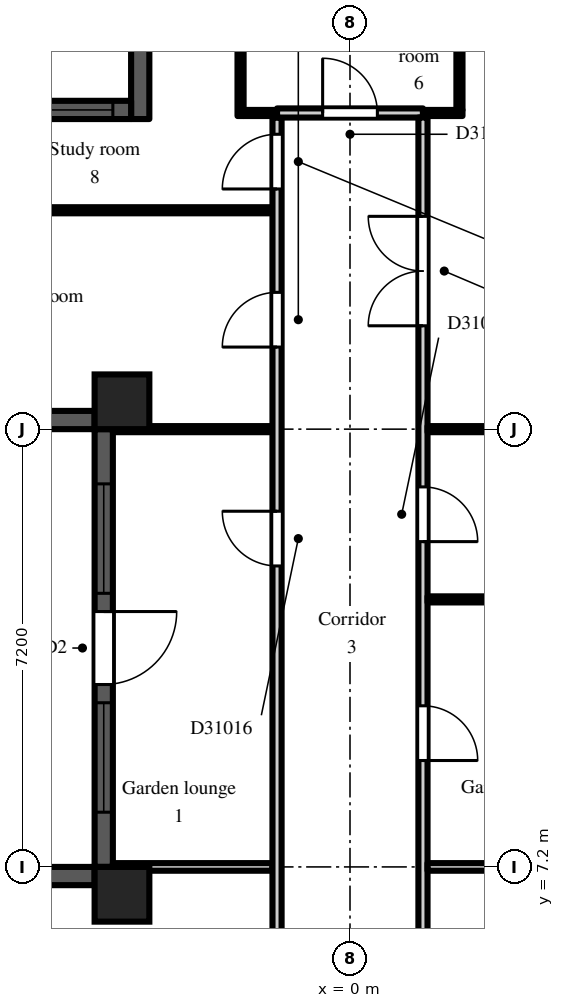
"""IFC4 building model, lengths in metres.
Left out: names, types, materials, properties, quantities, classifications, styles, units other than length and angle.
Written with IfcOpenShell. Run it as: python <this file> out.ifc"""

import sys

from ifc_helpers import new_model, si_unit, direction, frame, frame_2d, origin, origin_2d, place, context, subcontext, project, spatial, rectangle, extrude, element, fill, save


model = new_model("IFC4")
c1 = context("Model", 3, precision=1e-05, world=origin(), true_north=direction((0.0, 1.0)))
c2 = subcontext(c1, "Body", "Model", "MODEL_VIEW")
j1 = project(units=[si_unit("LENGTHUNIT", "METRE"), si_unit("PLANEANGLEUNIT", "RADIAN")], contexts=[c1])
p1 = place(None, origin())
s1 = spatial("IfcSite", under=j1, at=p1, CompositionType="ELEMENT")
p2 = place(p1, origin())
s2 = spatial("IfcBuilding", under=s1, at=p2, CompositionType="ELEMENT")
p3 = place(p2, frame((0.0, 0.0, 216.9)))
s3 = spatial("IfcBuildingStorey", under=s2, at=p3, CompositionType="ELEMENT", Elevation=216.9)
for number, where, z_axis, x_axis in (
    (1, (-3.75, 6.75, 0.0), (0.0, 0.0, 1.0), (1.0, 0.0, 0.0)),
    (2, (-3.75, 14.85, 0.0), (0.0, 0.0, 1.0), (1.0, 0.0, 0.0)),
):
    element("IfcColumn", number, at=place(p3, frame(where, z_axis=z_axis, x_axis=x_axis)), inside=s3, PredefinedType="COLUMN", context=c2, shape_type="SweptSolid", body=[
        extrude(rectangle(XDim=0.9, YDim=0.9, at=origin_2d()), origin(), (0.0, 0.0, 1.0), 3.0),
    ])
p4 = place(p3, frame((-3.45, 20.7, 0.0), z_axis=(0.0, 0.0, 1.0), x_axis=(0.0, -1.0, 0.0)))
e3 = element("IfcWall", 3, at=p4, inside=s3, PredefinedType="SOLIDWALL", context=c2, shape_type="SweptSolid", body=[
    extrude(rectangle(XDim=1.2, YDim=0.3, at=frame_2d((0.6, 0.0))), origin(), (0.0, 0.0, 1.0), 2.6),
])
p5 = place(p3, frame((-3.6, 19.65, 0.0), z_axis=(0.0, 0.0, 1.0), x_axis=(-1.0, 0.0, 0.0)))
e4 = element("IfcWall", 4, at=p5, inside=s3, PredefinedType="SOLIDWALL", context=c2, shape_type="SweptSolid", body=[
    extrude(rectangle(XDim=1.8, YDim=0.3, at=frame_2d((0.9, 0.0))), origin(), (0.0, 0.0, 1.0), 2.6),
])
p6 = place(p5, frame((0.3, 0.0, 0.2)))
e5 = element("IfcOpeningElement", 5, at=p6, cuts=e4, PredefinedType="OPENING", context=c2, shape_type="SweptSolid", body=[
    extrude(rectangle(XDim=1.2, YDim=1.85, at=frame_2d((0.6, 0.925))), frame((0.0, 0.16, 0.0), z_axis=(0.0, -1.0, 0.0), x_axis=(1.0, 0.0, 0.0)), (0.0, 0.0, 1.0), 0.32),
])
p7 = place(p3, frame((-6.3, 14.55, 0.0), z_axis=(0.0, 0.0, 1.0), x_axis=(1.0, 0.0, 0.0)))
e6 = element("IfcWall", 6, at=p7, inside=s3, PredefinedType="SOLIDWALL", context=c2, shape_type="SweptSolid", body=[
    extrude(rectangle(XDim=2.1, YDim=0.3, at=frame_2d((1.05, 0.0))), origin(), (0.0, 0.0, 1.0), 2.3),
])
p8 = place(p3, frame((-4.05, 14.4, 0.0), z_axis=(0.0, 0.0, 1.0), x_axis=(0.0, -1.0, 0.0)))
e7 = element("IfcWall", 7, at=p8, inside=s3, PredefinedType="SOLIDWALL", context=c2, shape_type="SweptSolid", body=[
    extrude(rectangle(XDim=7.2, YDim=0.3, at=frame_2d((3.6, 0.0))), origin(), (0.0, 0.0, 1.0), 2.3),
])
p9 = place(p8, frame((3.0, 0.0, 0.0)))
e8 = element("IfcOpeningElement", 8, at=p9, cuts=e7, PredefinedType="OPENING", context=c2, shape_type="SweptSolid", body=[
    extrude(rectangle(XDim=1.2, YDim=2.05, at=frame_2d((0.6, 1.025))), frame((0.0, 0.16, 0.0), z_axis=(0.0, -1.0, 0.0), x_axis=(1.0, 0.0, 0.0)), (0.0, 0.0, 1.0), 0.32),
])
p10 = place(p8, frame((0.9, 0.0, 0.2)))
e9 = element("IfcOpeningElement", 9, at=p10, cuts=e7, PredefinedType="OPENING", context=c2, shape_type="SweptSolid", body=[
    extrude(rectangle(XDim=1.8, YDim=1.85, at=frame_2d((0.9, 0.925))), frame((0.0, 0.16, 0.0), z_axis=(0.0, -1.0, 0.0), x_axis=(1.0, 0.0, 0.0)), (0.0, 0.0, 1.0), 0.32),
])
p11 = place(p8, frame((4.5, 0.0, 0.2)))
e10 = element("IfcOpeningElement", 10, at=p11, cuts=e7, PredefinedType="OPENING", context=c2, shape_type="SweptSolid", body=[
    extrude(rectangle(XDim=1.8, YDim=1.85, at=frame_2d((0.9, 0.925))), frame((0.0, 0.16, 0.0), z_axis=(0.0, -1.0, 0.0), x_axis=(1.0, 0.0, 0.0)), (0.0, 0.0, 1.0), 0.32),
])
p12 = place(p3, frame((-4.2, 7.05, 0.0), z_axis=(0.0, 0.0, 1.0), x_axis=(-1.0, 0.0, 0.0)))
e11 = element("IfcWall", 11, at=p12, inside=s3, PredefinedType="SOLIDWALL", context=c2, shape_type="SweptSolid", body=[
    extrude(rectangle(XDim=3.0, YDim=0.3, at=frame_2d((1.5, 0.0))), origin(), (0.0, 0.0, 1.0), 2.3),
])
p13 = place(p3, frame((-5.1, 18.0, 0.0), z_axis=(0.0, 0.0, 1.0), x_axis=(1.0, 0.0, 0.0)))
e12 = element("IfcWall", 12, at=p13, inside=s3, PredefinedType="PARTITIONING", context=c2, shape_type="SweptSolid", body=[
    extrude(rectangle(XDim=3.825, YDim=0.1, at=frame_2d((1.913, 0.0))), origin(), (0.0, 0.0, 1.0), 2.6),
])
p14 = place(p3, frame((-3.9, 7.2, 0.0), z_axis=(0.0, 0.0, 1.0), x_axis=(1.0, 0.0, 0.0)))
e13 = element("IfcWall", 13, at=p14, inside=s3, PredefinedType="PARTITIONING", context=c2, shape_type="SweptSolid", body=[
    extrude(rectangle(XDim=2.625, YDim=0.125, at=frame_2d((1.312, 0.0))), origin(), (0.0, 0.0, 1.0), 2.6),
])
p15 = place(p3, frame((-3.9, 14.4, 0.0), z_axis=(0.0, 0.0, 1.0), x_axis=(1.0, 0.0, 0.0)))
e14 = element("IfcWall", 14, at=p15, inside=s3, PredefinedType="PARTITIONING", context=c2, shape_type="SweptSolid", body=[
    extrude(rectangle(XDim=2.625, YDim=0.1, at=frame_2d((1.312, 0.0))), origin(), (0.0, 0.0, 1.0), 2.6),
])
p16 = place(p3, frame((-1.8, 19.55, 0.0), z_axis=(0.0, 0.0, 1.0), x_axis=(0.0, 1.0, 0.0)))
e15 = element("IfcWall", 15, at=p16, inside=s3, PredefinedType="PARTITIONING", context=c2, shape_type="SweptSolid", body=[
    extrude(rectangle(XDim=1.75, YDim=0.1, at=frame_2d((0.875, 0.0))), origin(), (0.0, 0.0, 1.0), 2.6),
])
p17 = place(p3, frame((-1.75, 19.6, 0.0), z_axis=(0.0, 0.0, 1.0), x_axis=(1.0, 0.0, 0.0)))
e16 = element("IfcWall", 16, at=p17, inside=s3, PredefinedType="PARTITIONING", context=c2, shape_type="SweptSolid", body=[
    extrude(rectangle(XDim=0.55, YDim=0.1, at=frame_2d((0.275, 0.0))), origin(), (0.0, 0.0, 1.0), 2.6),
])
p18 = place(p3, frame((-1.2, 1.275, 0.0), z_axis=(0.0, 0.0, 1.0), x_axis=(0.0, 1.0, 0.0)))
e17 = element("IfcWall", 17, at=p18, inside=s3, PredefinedType="PARTITIONING", context=c2, shape_type="SweptSolid", body=[
    extrude(rectangle(XDim=18.25, YDim=0.15, at=frame_2d((9.125, 0.0))), origin(), (0.0, 0.0, 1.0), 2.6),
])
p19 = place(p18, frame((2.475, 0.0, 0.0)))
e18 = element("IfcOpeningElement", 18, at=p19, cuts=e17, PredefinedType="OPENING", context=c2, shape_type="SweptSolid", body=[
    extrude(rectangle(XDim=0.9, YDim=2.1, at=frame_2d((0.45, 1.05))), frame((0.0, 0.085, 0.0), z_axis=(0.0, -1.0, 0.0), x_axis=(1.0, 0.0, 0.0)), (0.0, 0.0, 1.0), 0.17),
])
p20 = place(p18, frame((10.875, 0.0, 0.0)))
e19 = element("IfcOpeningElement", 19, at=p20, cuts=e17, PredefinedType="OPENING", context=c2, shape_type="SweptSolid", body=[
    extrude(rectangle(XDim=0.9, YDim=2.1, at=frame_2d((0.45, 1.05))), frame((0.0, 0.085, 0.0), z_axis=(0.0, -1.0, 0.0), x_axis=(1.0, 0.0, 0.0)), (0.0, 0.0, 1.0), 0.17),
])
p21 = place(p18, frame((14.475, 0.0, 0.0)))
e20 = element("IfcOpeningElement", 20, at=p21, cuts=e17, PredefinedType="OPENING", context=c2, shape_type="SweptSolid", body=[
    extrude(rectangle(XDim=0.9, YDim=2.1, at=frame_2d((0.45, 1.05))), frame((0.0, 0.085, 0.0), z_axis=(0.0, -1.0, 0.0), x_axis=(1.0, 0.0, 0.0)), (0.0, 0.0, 1.0), 0.17),
])
p22 = place(p18, frame((17.075, 0.0, 0.0)))
e21 = element("IfcOpeningElement", 21, at=p22, cuts=e17, PredefinedType="OPENING", context=c2, shape_type="SweptSolid", body=[
    extrude(rectangle(XDim=0.9, YDim=2.1, at=frame_2d((0.45, 1.05))), frame((0.0, 0.085, 0.0), z_axis=(0.0, -1.0, 0.0), x_axis=(1.0, 0.0, 0.0)), (0.0, 0.0, 1.0), 0.17),
])
p23 = place(p3, frame((-1.2, 19.6, 0.0), z_axis=(0.0, 0.0, 1.0), x_axis=(1.0, 0.0, 0.0)))
e22 = element("IfcWall", 22, at=p23, inside=s3, PredefinedType="PARTITIONING", context=c2, shape_type="SweptSolid", body=[
    extrude(rectangle(XDim=2.4, YDim=0.15, at=frame_2d((1.2, 0.0))), origin(), (0.0, 0.0, 1.0), 2.6),
])
p24 = place(p23, frame((0.75, 0.0, 0.0)))
e23 = element("IfcOpeningElement", 23, at=p24, cuts=e22, PredefinedType="OPENING", context=c2, shape_type="SweptSolid", body=[
    extrude(rectangle(XDim=0.9, YDim=2.1, at=frame_2d((0.45, 1.05))), frame((0.0, 0.085, 0.0), z_axis=(0.0, -1.0, 0.0), x_axis=(1.0, 0.0, 0.0)), (0.0, 0.0, 1.0), 0.17),
])
p25 = place(p3, frame((1.2, 1.125, 0.0), z_axis=(0.0, 0.0, 1.0), x_axis=(0.0, 1.0, 0.0)))
e24 = element("IfcWall", 24, at=p25, inside=s3, PredefinedType="PARTITIONING", context=c2, shape_type="SweptSolid", body=[
    extrude(rectangle(XDim=18.4, YDim=0.15, at=frame_2d((9.2, 0.0))), origin(), (0.0, 0.0, 1.0), 2.6),
])
p26 = place(p25, frame((3.825, 0.0, 0.0)))
e25 = element("IfcOpeningElement", 25, at=p26, cuts=e24, PredefinedType="OPENING", context=c2, shape_type="SweptSolid", body=[
    extrude(rectangle(XDim=0.9, YDim=2.1, at=frame_2d((0.45, 1.05))), frame((0.0, 0.085, 0.0), z_axis=(0.0, -1.0, 0.0), x_axis=(1.0, 0.0, 0.0)), (0.0, 0.0, 1.0), 0.17),
])
p27 = place(p25, frame((11.425, 0.0, 0.0)))
e26 = element("IfcOpeningElement", 26, at=p27, cuts=e24, PredefinedType="OPENING", context=c2, shape_type="SweptSolid", body=[
    extrude(rectangle(XDim=0.9, YDim=2.1, at=frame_2d((0.45, 1.05))), frame((0.0, 0.085, 0.0), z_axis=(0.0, -1.0, 0.0), x_axis=(1.0, 0.0, 0.0)), (0.0, 0.0, 1.0), 0.17),
])
p28 = place(p25, frame((7.825, 0.0, 0.0)))
e27 = element("IfcOpeningElement", 27, at=p28, cuts=e24, PredefinedType="OPENING", context=c2, shape_type="SweptSolid", body=[
    extrude(rectangle(XDim=0.9, YDim=2.1, at=frame_2d((0.45, 1.05))), frame((0.0, 0.085, 0.0), z_axis=(0.0, -1.0, 0.0), x_axis=(1.0, 0.0, 0.0)), (0.0, 0.0, 1.0), 0.17),
])
p29 = place(p25, frame((14.975, 0.0, 0.0)))
e28 = element("IfcOpeningElement", 28, at=p29, cuts=e24, PredefinedType="OPENING", context=c2, shape_type="SweptSolid", body=[
    extrude(rectangle(XDim=1.8, YDim=2.1, at=frame_2d((0.9, 1.05))), frame((0.0, 0.085, 0.0), z_axis=(0.0, -1.0, 0.0), x_axis=(1.0, 0.0, 0.0)), (0.0, 0.0, 1.0), 0.17),
])
p30 = place(p3, frame((1.275, 7.2, 0.0), z_axis=(0.0, 0.0, 1.0), x_axis=(1.0, 0.0, 0.0)))
e29 = element("IfcWall", 29, at=p30, inside=s3, PredefinedType="PARTITIONING", context=c2, shape_type="SweptSolid", body=[
    extrude(rectangle(XDim=2.625, YDim=0.125, at=frame_2d((1.312, 0.0))), origin(), (0.0, 0.0, 1.0), 2.6),
])
for number, where, z_axis, x_axis in (
    (30, (1.275, 11.6, 0.0), (0.0, 0.0, 1.0), (1.0, 0.0, 0.0)),
    (31, (1.275, 14.4, 0.0), (0.0, 0.0, 1.0), (1.0, 0.0, 0.0)),
):
    element("IfcWall", number, at=place(p3, frame(where, z_axis=z_axis, x_axis=x_axis)), inside=s3, PredefinedType="PARTITIONING", context=c2, shape_type="SweptSolid", body=[
        extrude(rectangle(XDim=2.625, YDim=0.1, at=frame_2d((1.312, 0.0))), origin(), (0.0, 0.0, 1.0), 2.6),
    ])
p31 = place(p3, frame((1.2, 19.6, 0.0), z_axis=(0.0, 0.0, 1.0), x_axis=(1.0, 0.0, 0.0)))
e32 = element("IfcWall", 32, at=p31, inside=s3, PredefinedType="PARTITIONING", context=c2, shape_type="SweptSolid", body=[
    extrude(rectangle(XDim=0.65, YDim=0.1, at=frame_2d((0.325, 0.0))), origin(), (0.0, 0.0, 1.0), 2.6),
])
p32 = place(p3, frame((1.8, 19.65, 0.0), z_axis=(0.0, 0.0, 1.0), x_axis=(0.0, 1.0, 0.0)))
e33 = element("IfcWall", 33, at=p32, inside=s3, PredefinedType="PARTITIONING", context=c2, shape_type="SweptSolid", body=[
    extrude(rectangle(XDim=1.65, YDim=0.1, at=frame_2d((0.825, 0.0))), origin(), (0.0, 0.0, 1.0), 2.6),
])
p33 = place(p6, origin())
e34 = element("IfcWindow", 34, at=p33, inside=s3, PartitioningType="SINGLE_PANEL", PredefinedType="WINDOW", context=c2, shape_type="SweptSolid", body=[
    extrude(rectangle(XDim=1.2, YDim=1.85, at=frame_2d((0.6, 0.925))), frame((0.0, 0.03, 0.0), z_axis=(0.0, -1.0, 0.0), x_axis=(1.0, 0.0, 0.0)), (0.0, 0.0, 1.0), 0.06),
])
fill(e5, e34)
p34 = place(p9, origin())
e35 = element("IfcDoor", 35, at=p34, inside=s3, OperationType="SINGLE_SWING_LEFT", PredefinedType="DOOR", context=c2, shape_type="SweptSolid", body=[
    extrude(rectangle(XDim=1.2, YDim=2.05, at=frame_2d((0.6, 1.025))), frame((0.0, 0.025, 0.0), z_axis=(0.0, -1.0, 0.0), x_axis=(1.0, 0.0, 0.0)), (0.0, 0.0, 1.0), 0.05),
])
fill(e8, e35)
p35 = place(p10, origin())
e36 = element("IfcWindow", 36, at=p35, inside=s3, PartitioningType="SINGLE_PANEL", PredefinedType="WINDOW", context=c2, shape_type="SweptSolid", body=[
    extrude(rectangle(XDim=1.8, YDim=1.85, at=frame_2d((0.9, 0.925))), frame((0.0, 0.03, 0.0), z_axis=(0.0, -1.0, 0.0), x_axis=(1.0, 0.0, 0.0)), (0.0, 0.0, 1.0), 0.06),
])
fill(e9, e36)
p36 = place(p11, origin())
e37 = element("IfcWindow", 37, at=p36, inside=s3, PartitioningType="SINGLE_PANEL", PredefinedType="WINDOW", context=c2, shape_type="SweptSolid", body=[
    extrude(rectangle(XDim=1.8, YDim=1.85, at=frame_2d((0.9, 0.925))), frame((0.0, 0.03, 0.0), z_axis=(0.0, -1.0, 0.0), x_axis=(1.0, 0.0, 0.0)), (0.0, 0.0, 1.0), 0.06),
])
fill(e10, e37)
p37 = place(p24, origin())
e38 = element("IfcDoor", 38, at=p37, inside=s3, OperationType="SINGLE_SWING_LEFT", PredefinedType="DOOR", context=c2, shape_type="SweptSolid", body=[
    extrude(rectangle(XDim=0.9, YDim=2.1, at=frame_2d((0.45, 1.05))), frame((0.0, 0.025, 0.0), z_axis=(0.0, -1.0, 0.0), x_axis=(1.0, 0.0, 0.0)), (0.0, 0.0, 1.0), 0.05),
])
fill(e23, e38)
p38 = place(p20, origin())
e39 = element("IfcDoor", 39, at=p38, inside=s3, OperationType="SINGLE_SWING_RIGHT", PredefinedType="DOOR", context=c2, shape_type="SweptSolid", body=[
    extrude(rectangle(XDim=0.9, YDim=2.1, at=frame_2d((0.45, 1.05))), frame((0.0, 0.025, 0.0), z_axis=(0.0, -1.0, 0.0), x_axis=(1.0, 0.0, 0.0)), (0.0, 0.0, 1.0), 0.05),
])
fill(e19, e39)
p39 = place(p21, origin())
e40 = element("IfcDoor", 40, at=p39, inside=s3, OperationType="SINGLE_SWING_LEFT", PredefinedType="DOOR", context=c2, shape_type="SweptSolid", body=[
    extrude(rectangle(XDim=0.9, YDim=2.1, at=frame_2d((0.45, 1.05))), frame((0.0, 0.025, 0.0), z_axis=(0.0, -1.0, 0.0), x_axis=(1.0, 0.0, 0.0)), (0.0, 0.0, 1.0), 0.05),
])
fill(e20, e40)
p40 = place(p22, origin())
e41 = element("IfcDoor", 41, at=p40, inside=s3, OperationType="SINGLE_SWING_LEFT", PredefinedType="DOOR", context=c2, shape_type="SweptSolid", body=[
    extrude(rectangle(XDim=0.9, YDim=2.1, at=frame_2d((0.45, 1.05))), frame((0.0, 0.025, 0.0), z_axis=(0.0, -1.0, 0.0), x_axis=(1.0, 0.0, 0.0)), (0.0, 0.0, 1.0), 0.05),
])
fill(e21, e41)
p41 = place(p27, frame((0.9, 0.0, 0.0), z_axis=(0.0, 0.0, 1.0), x_axis=(-1.0, 0.0, 0.0)))
e42 = element("IfcDoor", 42, at=p41, inside=s3, OperationType="SINGLE_SWING_RIGHT", PredefinedType="DOOR", context=c2, shape_type="SweptSolid", body=[
    extrude(rectangle(XDim=0.9, YDim=2.1, at=frame_2d((0.45, 1.05))), frame((0.0, 0.025, 0.0), z_axis=(0.0, -1.0, 0.0), x_axis=(1.0, 0.0, 0.0)), (0.0, 0.0, 1.0), 0.05),
])
fill(e26, e42)
p42 = place(p28, frame((0.9, 0.0, 0.0), z_axis=(0.0, 0.0, 1.0), x_axis=(-1.0, 0.0, 0.0)))
e43 = element("IfcDoor", 43, at=p42, inside=s3, OperationType="SINGLE_SWING_RIGHT", PredefinedType="DOOR", context=c2, shape_type="SweptSolid", body=[
    extrude(rectangle(XDim=0.9, YDim=2.1, at=frame_2d((0.45, 1.05))), frame((0.0, 0.025, 0.0), z_axis=(0.0, -1.0, 0.0), x_axis=(1.0, 0.0, 0.0)), (0.0, 0.0, 1.0), 0.05),
])
fill(e27, e43)
p43 = place(p29, origin())
e44 = element("IfcDoor", 44, at=p43, inside=s3, OperationType="DOUBLE_DOOR_DOUBLE_SWING", PredefinedType="DOOR", context=c2, shape_type="SweptSolid", body=[
    extrude(rectangle(XDim=1.8, YDim=2.1, at=frame_2d((0.9, 1.05))), frame((0.0, 0.025, 0.0), z_axis=(0.0, -1.0, 0.0), x_axis=(1.0, 0.0, 0.0)), (0.0, 0.0, 1.0), 0.05),
])
fill(e28, e44)
save(model, sys.argv[1])
